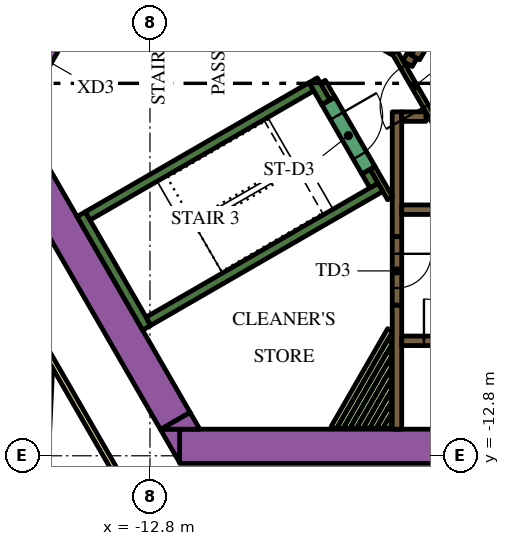
"""IFC4 building model, lengths in metres.
Left out: names, types, materials, properties, quantities, classifications, styles, units other than length and angle.
Written with IfcOpenShell. Run it as: python <this file> out.ifc"""

import sys

from ifc_helpers import new_model, si_unit, direction, frame, frame_2d, origin, place, context, subcontext, project, spatial, polyline, rectangle, outline, extrude, element, fill, save


model = new_model("IFC4")
c1 = context("Model", 3, precision=1e-05, world=origin(), true_north=direction((0.0, 1.0)))
c2 = subcontext(c1, "Body", "Model", "MODEL_VIEW")
j1 = project(units=[si_unit("LENGTHUNIT", "METRE"), si_unit("PLANEANGLEUNIT", "RADIAN")], contexts=[c1])
p1 = place(None, origin())
s1 = spatial("IfcSite", under=j1, at=p1, CompositionType="ELEMENT")
p2 = place(p1, origin())
s2 = spatial("IfcBuilding", under=s1, at=p2, CompositionType="ELEMENT")
p3 = place(p2, frame((0.0, 0.0, 66.6)))
s3 = spatial("IfcBuildingStorey", under=s2, at=p3, CompositionType="ELEMENT", Elevation=66.6)
p4 = place(p3, frame((-12.019, -12.55, 0.0), z_axis=(0.0, 0.0, 1.0), x_axis=(1.0, 0.0, 0.0)))
e1 = element("IfcWall", 1, at=p4, inside=s3, PredefinedType="SOLIDWALL", context=c2, shape_type="SweptSolid", body=[
    extrude(rectangle(XDim=21.63, YDim=0.9, at=frame_2d((10.815, 0.0))), origin(), (0.0, 0.0, 1.0), 3.9),
])
p5 = place(p3, origin())
e2 = element("IfcWall", 2, at=p5, inside=s3, PredefinedType="SOLIDWALL", context=c2, shape_type="SweptSolid", body=[
    extrude(outline(polyline([(-12.529, -12.1), (-12.021, -12.1), (-12.021, -12.98), (-12.529, -12.1)])), origin(), (0.0, 0.0, 1.0), 3.9),
])
p6 = place(p3, frame((-12.134, -11.883, 0.0), z_axis=(0.0, 0.0, 1.0), x_axis=(-0.500005339912, 0.866022320763, 0.0)))
e3 = element("IfcWall", 3, at=p6, inside=s3, PredefinedType="SOLIDWALL", context=c2, shape_type="SweptSolid", body=[
    extrude(rectangle(XDim=9.488, YDim=0.9, at=frame_2d((4.744, 0.0))), origin(), (0.0, 0.0, 1.0), 3.9),
])
e4 = element("IfcWall", 4, at=p5, inside=s3, PredefinedType="SOLIDWALL", context=c2, shape_type="SweptSolid", body=[
    extrude(outline(polyline([(-11.489, -12.1), (-12.505, -12.1), (-11.743, -11.66), (-11.489, -12.1)])), origin(), (0.0, 0.0, 1.0), 3.9),
])
p7 = place(p3, frame((-12.885, -9.431, 0.0), z_axis=(0.0, 0.0, 1.0), x_axis=(-0.500020560727, 0.866013532718, 0.0)))
e5 = element("IfcWall", 5, at=p7, inside=s3, PredefinedType="SOLIDWALL", context=c2, shape_type="SweptSolid", body=[
    extrude(rectangle(XDim=3.45, YDim=0.25, at=frame_2d((1.725, 0.0))), origin(), (0.0, 0.0, 1.0), 3.9),
])
p8 = place(p3, frame((-14.44, -6.49, 0.0), z_axis=(0.0, 0.0, 1.0), x_axis=(0.866022966069, 0.500004222222, 0.0)))
e6 = element("IfcWall", 6, at=p8, inside=s3, PredefinedType="SOLIDWALL", context=c2, shape_type="SweptSolid", body=[
    extrude(rectangle(XDim=6.8, YDim=0.25, at=frame_2d((3.4, 0.0))), origin(), (0.0, 0.0, 1.0), 3.9),
])
p9 = place(p3, frame((-8.168, -3.503, 0.0), z_axis=(0.0, 0.0, 1.0), x_axis=(-0.499952099219, 0.866053057547, 0.0)))
e7 = element("IfcWall", 7, at=p9, inside=s3, PredefinedType="SOLIDWALL", context=c2, shape_type="SweptSolid", body=[
    extrude(rectangle(XDim=0.675, YDim=0.25, at=frame_2d((0.337, 0.0))), origin(), (0.0, 0.0, 1.0), 3.9),
])
p10 = place(p3, frame((-12.84, -9.261, 0.0), z_axis=(0.0, 0.0, 1.0), x_axis=(0.866016039709, 0.500016218704, 0.0)))
e8 = element("IfcWall", 8, at=p10, inside=s3, PredefinedType="SOLIDWALL", context=c2, shape_type="SweptSolid", body=[
    extrude(rectangle(XDim=7.05, YDim=0.25, at=frame_2d((3.525, 0.0))), origin(), (0.0, 0.0, 1.0), 3.9),
])
p11 = place(p3, frame((-6.905, -5.69, 0.0), z_axis=(0.0, 0.0, 1.0), x_axis=(-0.500402024738, 0.865793170242, 0.0)))
e9 = element("IfcWall", 9, at=p11, inside=s3, PredefinedType="SOLIDWALL", context=c2, shape_type="SweptSolid", body=[
    extrude(rectangle(XDim=0.425, YDim=0.25, at=frame_2d((0.212, 0.0))), origin(), (0.0, 0.0, 1.0), 3.9),
])
p12 = place(p3, frame((-6.3, -12.1, 0.0), z_axis=(0.0, 0.0, 1.0), x_axis=(0.0, 1.0, 0.0)))
e10 = element("IfcWall", 10, at=p12, inside=s3, PredefinedType="SOLIDWALL", context=c2, shape_type="SweptSolid", body=[
    extrude(rectangle(XDim=3.265, YDim=0.25, at=frame_2d((1.632, 0.0))), origin(), (0.0, 0.0, 1.0), 3.9),
])
p13 = place(p3, frame((-6.3, -7.035, 0.0), z_axis=(0.0, 0.0, 1.0), x_axis=(0.0, 1.0, 0.0)))
e11 = element("IfcWall", 11, at=p13, inside=s3, PredefinedType="SOLIDWALL", context=c2, shape_type="SweptSolid", body=[
    extrude(rectangle(XDim=3.285, YDim=0.25, at=frame_2d((1.643, 0.0))), origin(), (0.0, 0.0, 1.0), 3.9),
])
p14 = place(p3, frame((-6.175, -3.875, 0.0), z_axis=(0.0, 0.0, 1.0), x_axis=(1.0, 0.0, 0.0)))
e12 = element("IfcWall", 12, at=p14, inside=s3, PredefinedType="SOLIDWALL", context=c2, shape_type="SweptSolid", body=[
    extrude(rectangle(XDim=0.637, YDim=0.25, at=frame_2d((0.318, 0.0))), origin(), (0.0, 0.0, 1.0), 3.9),
])
p15 = place(p3, frame((-6.088, -2.305, 0.0), z_axis=(0.0, 0.0, 1.0), x_axis=(0.866059450854, -0.499941024108, 0.0)))
e13 = element("IfcWall", 13, at=p15, inside=s3, PredefinedType="SOLIDWALL", context=c2, shape_type="SweptSolid", body=[
    extrude(rectangle(XDim=0.29, YDim=0.25, at=frame_2d((0.145, 0.0))), origin(), (0.0, 0.0, 1.0), 3.9),
])
p16 = place(p3, frame((-7.889, -1.265, 0.0), z_axis=(0.0, 0.0, 1.0), x_axis=(0.865986741702, -0.500066958712, 0.0)))
e14 = element("IfcWall", 14, at=p16, inside=s3, PredefinedType="SOLIDWALL", context=c2, shape_type="SweptSolid", body=[
    extrude(rectangle(XDim=1.738, YDim=0.25, at=frame_2d((0.869, 0.0))), origin(), (0.0, 0.0, 1.0), 3.9),
])
p17 = place(p3, frame((-7.968, -12.068, 0.0), z_axis=(0.0, 0.0, 1.0), x_axis=(0.500013701029, 0.866017493347, 0.0)))
e15 = element("IfcWall", 15, at=p17, inside=s3, PredefinedType="PARTITIONING", context=c2, shape_type="SweptSolid", body=[
    extrude(rectangle(XDim=2.975, YDim=0.15, at=frame_2d((1.488, 0.0))), origin(), (0.0, 0.0, 1.0), 2.75),
])
p18 = place(p3, frame((-7.794, -12.068, 0.0), z_axis=(0.0, 0.0, 1.0), x_axis=(0.499985098601, 0.86603400694, 0.0)))
e16 = element("IfcWall", 16, at=p18, inside=s3, PredefinedType="PARTITIONING", context=c2, shape_type="SweptSolid", body=[
    extrude(rectangle(XDim=2.628, YDim=0.15, at=frame_2d((1.314, 0.0))), origin(), (0.0, 0.0, 1.0), 2.75),
])
p19 = place(p3, frame((-7.621, -12.068, 0.0), z_axis=(0.0, 0.0, 1.0), x_axis=(0.500028047758, 0.866009209798, 0.0)))
e17 = element("IfcWall", 17, at=p19, inside=s3, PredefinedType="PARTITIONING", context=c2, shape_type="SweptSolid", body=[
    extrude(rectangle(XDim=2.282, YDim=0.15, at=frame_2d((1.141, 0.0))), origin(), (0.0, 0.0, 1.0), 2.75),
])
p20 = place(p3, frame((-7.448, -12.068, 0.0), z_axis=(0.0, 0.0, 1.0), x_axis=(0.500031751504, 0.866007071269, 0.0)))
e18 = element("IfcWall", 18, at=p20, inside=s3, PredefinedType="PARTITIONING", context=c2, shape_type="SweptSolid", body=[
    extrude(rectangle(XDim=1.936, YDim=0.15, at=frame_2d((0.968, 0.0))), origin(), (0.0, 0.0, 1.0), 2.75),
])
p21 = place(p3, frame((-7.275, -12.068, 0.0), z_axis=(0.0, 0.0, 1.0), x_axis=(0.499988385283, 0.86603210944, 0.0)))
e19 = element("IfcWall", 19, at=p21, inside=s3, PredefinedType="PARTITIONING", context=c2, shape_type="SweptSolid", body=[
    extrude(rectangle(XDim=1.589, YDim=0.15, at=frame_2d((0.795, 0.0))), origin(), (0.0, 0.0, 1.0), 2.75),
])
p22 = place(p3, frame((-7.102, -12.068, 0.0), z_axis=(0.0, 0.0, 1.0), x_axis=(0.500068153333, 0.865986051864, 0.0)))
e20 = element("IfcWall", 20, at=p22, inside=s3, PredefinedType="PARTITIONING", context=c2, shape_type="SweptSolid", body=[
    extrude(rectangle(XDim=1.243, YDim=0.15, at=frame_2d((0.622, 0.0))), origin(), (0.0, 0.0, 1.0), 2.75),
])
p23 = place(p3, frame((-6.928, -12.068, 0.0), z_axis=(0.0, 0.0, 1.0), x_axis=(0.500005339912, 0.866022320763, 0.0)))
e21 = element("IfcWall", 21, at=p23, inside=s3, PredefinedType="PARTITIONING", context=c2, shape_type="SweptSolid", body=[
    extrude(rectangle(XDim=0.896, YDim=0.15, at=frame_2d((0.448, 0.0))), origin(), (0.0, 0.0, 1.0), 2.75),
])
p24 = place(p3, frame((-6.755, -12.068, 0.0), z_axis=(0.0, 0.0, 1.0), x_axis=(0.500196256984, 0.865912065108, 0.0)))
e22 = element("IfcWall", 22, at=p24, inside=s3, PredefinedType="PARTITIONING", context=c2, shape_type="SweptSolid", body=[
    extrude(rectangle(XDim=0.55, YDim=0.15, at=frame_2d((0.275, 0.0))), origin(), (0.0, 0.0, 1.0), 2.75),
])
p25 = place(p3, frame((-6.582, -12.068, 0.0), z_axis=(0.0, 0.0, 1.0), x_axis=(0.499618727529, 0.866245419672, 0.0)))
e23 = element("IfcWall", 23, at=p25, inside=s3, PredefinedType="PARTITIONING", context=c2, shape_type="SweptSolid", body=[
    extrude(rectangle(XDim=0.204, YDim=0.15, at=frame_2d((0.102, 0.0))), origin(), (0.0, 0.0, 1.0), 2.75),
])
p26 = place(p3, frame((-6.48, -6.027, 0.0), z_axis=(0.0, 0.0, 1.0), x_axis=(-0.499927229454, 0.866067413802, 0.0)))
e24 = element("IfcWall", 24, at=p26, inside=s3, PredefinedType="PARTITIONING", context=c2, shape_type="SweptSolid", body=[
    extrude(rectangle(XDim=0.929, YDim=0.15, at=frame_2d((0.464, 0.0))), origin(), (0.0, 0.0, 1.0), 3.9),
])
p27 = place(p3, frame((-8.252, -2.958, 0.0), z_axis=(0.0, 0.0, 1.0), x_axis=(0.500174715838, -0.865924508047, 0.0)))
e25 = element("IfcWall", 25, at=p27, inside=s3, PredefinedType="PARTITIONING", context=c2, shape_type="SweptSolid", body=[
    extrude(rectangle(XDim=0.514, YDim=0.15, at=frame_2d((0.257, 0.0))), origin(), (0.0, 0.0, 1.0), 2.75),
])
p28 = place(p3, frame((-6.175, -9.775, 0.0), z_axis=(0.0, 0.0, 1.0), x_axis=(1.0, 0.0, 0.0)))
e26 = element("IfcWall", 26, at=p28, inside=s3, PredefinedType="SOLIDWALL", context=c2, shape_type="SweptSolid", body=[
    extrude(rectangle(XDim=12.35, YDim=0.25, at=frame_2d((6.175, 0.0))), origin(), (0.0, 0.0, 1.0), 3.9),
])
p29 = place(p28, frame((0.585, 0.0, 0.0)))
e27 = element("IfcOpeningElement", 27, at=p29, cuts=e26, PredefinedType="OPENING", context=c2, shape_type="SweptSolid", body=[
    extrude(rectangle(XDim=1.1, YDim=2.1, at=frame_2d((0.55, 1.05))), frame((0.0, 0.135, 0.0), z_axis=(0.0, -1.0, 0.0), x_axis=(1.0, 0.0, 0.0)), (0.0, 0.0, 1.0), 0.27),
])
p30 = place(p28, frame((3.105, 0.0, 0.0)))
e28 = element("IfcOpeningElement", 28, at=p30, cuts=e26, PredefinedType="OPENING", context=c2, shape_type="SweptSolid", body=[
    extrude(rectangle(XDim=1.1, YDim=2.1, at=frame_2d((0.55, 1.05))), frame((0.0, 0.135, 0.0), z_axis=(0.0, -1.0, 0.0), x_axis=(1.0, 0.0, 0.0)), (0.0, 0.0, 1.0), 0.27),
])
p31 = place(p28, frame((5.625, 0.0, 0.0)))
e29 = element("IfcOpeningElement", 29, at=p31, cuts=e26, PredefinedType="OPENING", context=c2, shape_type="SweptSolid", body=[
    extrude(rectangle(XDim=1.1, YDim=2.1, at=frame_2d((0.55, 1.05))), frame((0.0, 0.135, 0.0), z_axis=(0.0, -1.0, 0.0), x_axis=(1.0, 0.0, 0.0)), (0.0, 0.0, 1.0), 0.27),
])
p32 = place(p28, frame((8.145, 0.0, 0.0)))
e30 = element("IfcOpeningElement", 30, at=p32, cuts=e26, PredefinedType="OPENING", context=c2, shape_type="SweptSolid", body=[
    extrude(rectangle(XDim=1.1, YDim=2.1, at=frame_2d((0.55, 1.05))), frame((0.0, 0.135, 0.0), z_axis=(0.0, -1.0, 0.0), x_axis=(1.0, 0.0, 0.0)), (0.0, 0.0, 1.0), 0.27),
])
p33 = place(p28, frame((10.665, 0.0, 0.0)))
e31 = element("IfcOpeningElement", 31, at=p33, cuts=e26, PredefinedType="OPENING", context=c2, shape_type="SweptSolid", body=[
    extrude(rectangle(XDim=1.1, YDim=2.1, at=frame_2d((0.55, 1.05))), frame((0.0, 0.135, 0.0), z_axis=(0.0, -1.0, 0.0), x_axis=(1.0, 0.0, 0.0)), (0.0, 0.0, 1.0), 0.27),
])
p34 = place(p3, frame((-6.175, -6.325, 0.0), z_axis=(0.0, 0.0, 1.0), x_axis=(1.0, 0.0, 0.0)))
e32 = element("IfcWall", 32, at=p34, inside=s3, PredefinedType="SOLIDWALL", context=c2, shape_type="SweptSolid", body=[
    extrude(rectangle(XDim=12.35, YDim=0.25, at=frame_2d((6.175, 0.0))), origin(), (0.0, 0.0, 1.0), 3.9),
])
p35 = place(p34, frame((3.205, 0.0, 0.0)))
e33 = element("IfcOpeningElement", 33, at=p35, cuts=e32, PredefinedType="OPENING", context=c2, shape_type="SweptSolid", body=[
    extrude(rectangle(XDim=0.9, YDim=2.1, at=frame_2d((0.45, 1.05))), frame((0.0, 0.135, 0.0), z_axis=(0.0, -1.0, 0.0), x_axis=(1.0, 0.0, 0.0)), (0.0, 0.0, 1.0), 0.27),
])
p36 = place(p34, frame((8.145, 0.0, 0.0)))
e34 = element("IfcOpeningElement", 34, at=p36, cuts=e32, PredefinedType="OPENING", context=c2, shape_type="SweptSolid", body=[
    extrude(rectangle(XDim=1.1, YDim=2.1, at=frame_2d((0.55, 1.05))), frame((0.0, 0.135, 0.0), z_axis=(0.0, -1.0, 0.0), x_axis=(1.0, 0.0, 0.0)), (0.0, 0.0, 1.0), 0.27),
])
p37 = place(p34, frame((10.665, 0.0, 0.0)))
e35 = element("IfcOpeningElement", 35, at=p37, cuts=e32, PredefinedType="OPENING", context=c2, shape_type="SweptSolid", body=[
    extrude(rectangle(XDim=1.1, YDim=2.1, at=frame_2d((0.55, 1.05))), frame((0.0, 0.135, 0.0), z_axis=(0.0, -1.0, 0.0), x_axis=(1.0, 0.0, 0.0)), (0.0, 0.0, 1.0), 0.27),
])
p38 = place(p3, frame((-0.898, 6.194, 0.0), z_axis=(0.0, 0.0, 1.0), x_axis=(-0.499996202215, -0.866027596426, 0.0)))
e36 = element("IfcWall", 36, at=p38, inside=s3, PredefinedType="SOLIDWALL", context=c2, shape_type="SweptSolid", body=[
    extrude(rectangle(XDim=9.83, YDim=0.25, at=frame_2d((4.915, 0.0))), origin(), (0.0, 0.0, 1.0), 3.9),
])
p39 = place(p38, frame((0.585, 0.0, 0.0)))
e37 = element("IfcOpeningElement", 37, at=p39, cuts=e36, PredefinedType="OPENING", context=c2, shape_type="SweptSolid", body=[
    extrude(rectangle(XDim=1.1, YDim=2.1, at=frame_2d((0.55, 1.05))), frame((0.0, 0.135, 0.0), z_axis=(0.0, -1.0, 0.0), x_axis=(1.0, 0.0, 0.0)), (0.0, 0.0, 1.0), 0.27),
])
p40 = place(p38, frame((3.105, 0.0, 0.0)))
e38 = element("IfcOpeningElement", 38, at=p40, cuts=e36, PredefinedType="OPENING", context=c2, shape_type="SweptSolid", body=[
    extrude(rectangle(XDim=1.1, YDim=2.1, at=frame_2d((0.55, 1.05))), frame((0.0, 0.135, 0.0), z_axis=(0.0, -1.0, 0.0), x_axis=(1.0, 0.0, 0.0)), (0.0, 0.0, 1.0), 0.27),
])
p41 = place(p38, frame((5.625, 0.0, 0.0)))
e39 = element("IfcOpeningElement", 39, at=p41, cuts=e36, PredefinedType="OPENING", context=c2, shape_type="SweptSolid", body=[
    extrude(rectangle(XDim=1.1, YDim=2.1, at=frame_2d((0.55, 1.05))), frame((0.0, 0.135, 0.0), z_axis=(0.0, -1.0, 0.0), x_axis=(1.0, 0.0, 0.0)), (0.0, 0.0, 1.0), 0.27),
])
p42 = place(p38, frame((8.145, 0.0, 0.0)))
e40 = element("IfcOpeningElement", 40, at=p42, cuts=e36, PredefinedType="OPENING", context=c2, shape_type="SweptSolid", body=[
    extrude(rectangle(XDim=1.1, YDim=2.1, at=frame_2d((0.55, 1.05))), frame((0.0, 0.135, 0.0), z_axis=(0.0, -1.0, 0.0), x_axis=(1.0, 0.0, 0.0)), (0.0, 0.0, 1.0), 0.27),
])
p43 = place(p3, frame((-8.103, -3.466, 0.0), z_axis=(0.0, 0.0, 1.0), x_axis=(0.500078061341, -0.865980330357, 0.0)))
e41 = element("IfcWall", 41, at=p43, inside=s3, PredefinedType="SOLIDWALL", context=c2, shape_type="SweptSolid", body=[
    extrude(rectangle(XDim=2.1, YDim=0.4, at=frame_2d((1.05, 0.0))), origin(), (0.0, 0.0, 1.0), 3.9),
])
p44 = place(p43, frame((0.45, 0.0, 0.0)))
e42 = element("IfcOpeningElement", 42, at=p44, cuts=e41, PredefinedType="OPENING", context=c2, shape_type="SweptSolid", body=[
    extrude(rectangle(XDim=1.2, YDim=2.1, at=frame_2d((0.6, 1.05))), frame((0.0, 0.21, 0.0), z_axis=(0.0, -1.0, 0.0), x_axis=(1.0, 0.0, 0.0)), (0.0, 0.0, 1.0), 0.42),
])
p45 = place(p3, frame((-6.3, -7.035, 0.0), z_axis=(0.0, 0.0, 1.0), x_axis=(0.0, -1.0, 0.0)))
e43 = element("IfcWall", 43, at=p45, inside=s3, PredefinedType="SOLIDWALL", context=c2, shape_type="SweptSolid", body=[
    extrude(rectangle(XDim=1.8, YDim=0.25, at=frame_2d((0.9, 0.0))), origin(), (0.0, 0.0, 1.0), 3.9),
])
p46 = place(p45, frame((0.45, 0.0, 0.0)))
e44 = element("IfcOpeningElement", 44, at=p46, cuts=e43, PredefinedType="OPENING", context=c2, shape_type="SweptSolid", body=[
    extrude(rectangle(XDim=0.9, YDim=2.1, at=frame_2d((0.45, 1.05))), frame((0.0, 0.135, 0.0), z_axis=(0.0, -1.0, 0.0), x_axis=(1.0, 0.0, 0.0)), (0.0, 0.0, 1.0), 0.27),
])
p47 = place(p3, frame((-5.317, -3.99, 0.0), z_axis=(0.0, 0.0, 1.0), x_axis=(-0.500027713859, 0.866009402589, 0.0)))
e45 = element("IfcWall", 45, at=p47, inside=s3, PredefinedType="PARTITIONING", context=c2, shape_type="SweptSolid", body=[
    extrude(rectangle(XDim=2.1, YDim=0.15, at=frame_2d((1.05, 0.0))), origin(), (0.0, 0.0, 1.0), 3.9),
])
p48 = place(p47, frame((0.45, 0.0, 0.0)))
e46 = element("IfcOpeningElement", 46, at=p48, cuts=e45, PredefinedType="OPENING", context=c2, shape_type="SweptSolid", body=[
    extrude(rectangle(XDim=1.2, YDim=2.1, at=frame_2d((0.6, 1.05))), frame((0.0, 0.085, 0.0), z_axis=(0.0, -1.0, 0.0), x_axis=(1.0, 0.0, 0.0)), (0.0, 0.0, 1.0), 0.17),
])
p49 = place(p3, frame((-16.209, -2.976, 0.0), z_axis=(0.0, 0.0, 1.0), x_axis=(0.499954529098, 0.86605165483, 0.0)))
e47 = element("IfcWall", 47, at=p49, inside=s3, PredefinedType="SOLIDWALL", context=c2, shape_type="SweptSolid", body=[
    extrude(rectangle(XDim=1.7, YDim=0.9, at=frame_2d((0.85, 0.0))), origin(), (0.0, 0.0, 1.0), 3.9),
])
p50 = place(p49, frame((0.25, 0.0, 0.0)))
e48 = element("IfcOpeningElement", 48, at=p50, cuts=e47, PredefinedType="OPENING", context=c2, shape_type="SweptSolid", body=[
    extrude(rectangle(XDim=1.2, YDim=2.1, at=frame_2d((0.6, 1.05))), frame((0.0, 0.46, 0.0), z_axis=(0.0, -1.0, 0.0), x_axis=(1.0, 0.0, 0.0)), (0.0, 0.0, 1.0), 0.92),
])
p51 = place(p3, frame((-19.081, -3.9, 0.0), z_axis=(0.0, 0.0, 1.0), x_axis=(0.499998313975, 0.866026377209, 0.0)))
e49 = element("IfcWall", 49, at=p51, inside=s3, PredefinedType="PARTITIONING", context=c2, shape_type="SweptSolid", body=[
    extrude(rectangle(XDim=25.766, YDim=0.15, at=frame_2d((12.883, 0.0))), origin(), (0.0, 0.0, 1.0), 2.75),
])
p52 = place(p51, frame((24.586, 0.0, 0.0)))
e50 = element("IfcOpeningElement", 50, at=p52, cuts=e49, PredefinedType="OPENING", context=c2, shape_type="SweptSolid", body=[
    extrude(rectangle(XDim=1.0, YDim=2.1, at=frame_2d((0.5, 1.05))), frame((0.0, 0.085, 0.0), z_axis=(0.0, -1.0, 0.0), x_axis=(1.0, 0.0, 0.0)), (0.0, 0.0, 1.0), 0.17),
])
p53 = place(p51, frame((9.948, 0.0, 0.0)))
e51 = element("IfcOpeningElement", 51, at=p53, cuts=e49, PredefinedType="OPENING", context=c2, shape_type="SweptSolid", body=[
    extrude(rectangle(XDim=1.0, YDim=2.1, at=frame_2d((0.5, 1.05))), frame((0.0, 0.085, 0.0), z_axis=(0.0, -1.0, 0.0), x_axis=(1.0, 0.0, 0.0)), (0.0, 0.0, 1.0), 0.17),
])
p54 = place(p51, frame((7.782, 0.0, 0.0)))
e52 = element("IfcOpeningElement", 52, at=p54, cuts=e49, PredefinedType="OPENING", context=c2, shape_type="SweptSolid", body=[
    extrude(rectangle(XDim=0.9, YDim=2.1, at=frame_2d((0.45, 1.05))), frame((0.0, 0.085, 0.0), z_axis=(0.0, -1.0, 0.0), x_axis=(1.0, 0.0, 0.0)), (0.0, 0.0, 1.0), 0.17),
])
p55 = place(p51, frame((4.658, 0.0, 0.0)))
e53 = element("IfcOpeningElement", 53, at=p55, cuts=e49, PredefinedType="OPENING", context=c2, shape_type="SweptSolid", body=[
    extrude(rectangle(XDim=0.9, YDim=2.1, at=frame_2d((0.45, 1.05))), frame((0.0, 0.085, 0.0), z_axis=(0.0, -1.0, 0.0), x_axis=(1.0, 0.0, 0.0)), (0.0, 0.0, 1.0), 0.17),
])
p56 = place(p3, frame((-12.918, -14.575, 0.0), z_axis=(0.0, 0.0, 1.0), x_axis=(-0.500009150678, 0.866020120573, 0.0)))
e54 = element("IfcWall", 54, at=p56, inside=s3, PredefinedType="PARTITIONING", context=c2, shape_type="SweptSolid", body=[
    extrude(rectangle(XDim=5.258, YDim=0.15, at=frame_2d((2.629, 0.0))), origin(), (0.0, 0.0, 1.0), 2.75),
])
p57 = place(p3, frame((-15.973, -22.109, 0.0), z_axis=(0.0, 0.0, 1.0), x_axis=(0.046191717129, 0.998932592955, 0.0)))
e55 = element("IfcWall", 55, at=p57, inside=s3, PredefinedType="PARTITIONING", context=c2, shape_type="SweptSolid", body=[
    extrude(rectangle(XDim=11.638, YDim=0.15, at=frame_2d((5.819, 0.0))), origin(), (0.0, 0.0, 1.0), 2.75),
])
p58 = place(p29, origin())
e56 = element("IfcDoor", 56, at=p58, inside=s3, OperationType="DOUBLE_DOOR_SLIDING", PredefinedType="DOOR", context=c2, shape_type="SweptSolid", body=[
    extrude(rectangle(XDim=1.1, YDim=2.1, at=frame_2d((0.55, 1.05))), frame((0.0, 0.025, 0.0), z_axis=(0.0, -1.0, 0.0), x_axis=(1.0, 0.0, 0.0)), (0.0, 0.0, 1.0), 0.05),
])
fill(e27, e56)
p59 = place(p44, origin())
e57 = element("IfcDoor", 57, at=p59, inside=s3, OperationType="SINGLE_SWING_LEFT", PredefinedType="DOOR", context=c2, shape_type="SweptSolid", body=[
    extrude(rectangle(XDim=1.2, YDim=2.1, at=frame_2d((0.6, 1.05))), frame((0.0, 0.025, 0.0), z_axis=(0.0, -1.0, 0.0), x_axis=(1.0, 0.0, 0.0)), (0.0, 0.0, 1.0), 0.05),
])
fill(e42, e57)
p60 = place(p46, origin())
e58 = element("IfcDoor", 58, at=p60, inside=s3, OperationType="SINGLE_SWING_LEFT", PredefinedType="DOOR", context=c2, shape_type="SweptSolid", body=[
    extrude(rectangle(XDim=0.9, YDim=2.1, at=frame_2d((0.45, 1.05))), frame((0.0, 0.025, 0.0), z_axis=(0.0, -1.0, 0.0), x_axis=(1.0, 0.0, 0.0)), (0.0, 0.0, 1.0), 0.05),
])
fill(e44, e58)
p61 = place(p48, origin())
e59 = element("IfcDoor", 59, at=p61, inside=s3, OperationType="SINGLE_SWING_LEFT", PredefinedType="DOOR", context=c2, shape_type="SweptSolid", body=[
    extrude(rectangle(XDim=1.2, YDim=2.1, at=frame_2d((0.6, 1.05))), frame((0.0, 0.025, 0.0), z_axis=(0.0, -1.0, 0.0), x_axis=(1.0, 0.0, 0.0)), (0.0, 0.0, 1.0), 0.05),
])
fill(e46, e59)
save(model, sys.argv[1])
